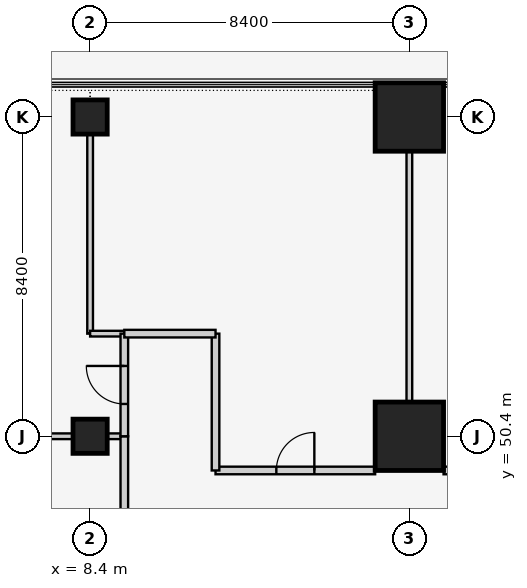
"""IFC4 building model, lengths in metres.
Left out: names, types, materials, properties, quantities, classifications, styles, units other than length and angle.
Written with IfcOpenShell. Run it as: python <this file> out.ifc"""

import sys

from ifc_helpers import new_model, si_unit, direction, frame, frame_2d, origin, origin_2d, place, context, subcontext, project, spatial, rectangle, extrude, element, fill, save


model = new_model("IFC4")
c1 = context("Model", 3, precision=1e-05, world=origin(), true_north=direction((0.0, 1.0)))
c2 = subcontext(c1, "Body", "Model", "MODEL_VIEW")
j1 = project(units=[si_unit("LENGTHUNIT", "METRE"), si_unit("PLANEANGLEUNIT", "RADIAN")], contexts=[c1])
p1 = place(None, origin())
s1 = spatial("IfcSite", under=j1, at=p1, CompositionType="ELEMENT")
p2 = place(p1, origin())
s2 = spatial("IfcBuilding", under=s1, at=p2, CompositionType="ELEMENT")
p3 = place(p2, origin())
s3 = spatial("IfcBuildingStorey", under=s2, at=p3, CompositionType="ELEMENT", Elevation=0.0)
for number, where, z_axis, x_axis in (
    (1, (8.4, 50.4, 0.0), (0.0, 0.0, 1.0), (1.0, 0.0, 0.0)),
    (2, (8.4, 58.8, 0.0), (0.0, 0.0, 1.0), (1.0, 0.0, 0.0)),
):
    element("IfcColumn", number, at=place(p3, frame(where, z_axis=z_axis, x_axis=x_axis)), inside=s3, PredefinedType="COLUMN", context=c2, shape_type="SweptSolid", body=[
        extrude(rectangle(XDim=0.9, YDim=0.9, at=origin_2d()), origin(), (0.0, 0.0, 1.0), 6.0),
    ])
for number, where, z_axis, x_axis in (
    (3, (16.8, 50.4, 0.0), (0.0, 0.0, 1.0), (1.0, 0.0, 0.0)),
    (4, (16.8, 58.8, 0.0), (0.0, 0.0, 1.0), (1.0, 0.0, 0.0)),
):
    element("IfcColumn", number, at=place(p3, frame(where, z_axis=z_axis, x_axis=x_axis)), inside=s3, PredefinedType="COLUMN", context=c2, shape_type="SweptSolid", body=[
        extrude(rectangle(XDim=1.8, YDim=1.8, at=origin_2d()), origin(), (0.0, 0.0, 1.0), 6.0),
    ])
p4 = place(p3, frame((0.45, 50.4, 0.0), z_axis=(0.0, 0.0, 1.0), x_axis=(1.0, 0.0, 0.0)))
e5 = element("IfcWall", 5, at=p4, inside=s3, PredefinedType="PARTITIONING", context=c2, shape_type="SweptSolid", body=[
    extrude(rectangle(XDim=7.5, YDim=0.15, at=frame_2d((3.75, 0.0))), origin(), (0.0, 0.0, 1.0), 5.043),
])
p5 = place(p3, frame((8.85, 50.4, 0.0), z_axis=(0.0, 0.0, 1.0), x_axis=(1.0, 0.0, 0.0)))
e6 = element("IfcWall", 6, at=p5, inside=s3, PredefinedType="PARTITIONING", context=c2, shape_type="SweptSolid", body=[
    extrude(rectangle(XDim=0.45, YDim=0.15, at=frame_2d((0.225, 0.0))), origin(), (0.0, 0.0, 1.0), 5.043),
])
p6 = place(p3, frame((9.3, 50.4, 0.0), z_axis=(0.0, 0.0, 1.0), x_axis=(0.0, -1.0, 0.0)))
e7 = element("IfcWall", 7, at=p6, inside=s3, PredefinedType="PARTITIONING", context=c2, shape_type="SweptSolid", body=[
    extrude(rectangle(XDim=5.8, YDim=0.2, at=frame_2d((2.9, 0.0))), origin(), (0.0, 0.0, 1.0), 5.8),
])
p7 = place(p6, frame((2.4, 0.0, 0.0)))
e8 = element("IfcOpeningElement", 8, at=p7, cuts=e7, PredefinedType="OPENING", context=c2, shape_type="SweptSolid", body=[
    extrude(rectangle(XDim=1.0, YDim=2.1, at=frame_2d((0.5, 1.05))), frame((0.0, 0.11, 0.0), z_axis=(0.0, -1.0, 0.0), x_axis=(1.0, 0.0, 0.0)), (0.0, 0.0, 1.0), 0.22),
])
p8 = place(p3, frame((16.8, 51.3, 0.0), z_axis=(0.0, 0.0, 1.0), x_axis=(0.0, 1.0, 0.0)))
e9 = element("IfcWall", 9, at=p8, inside=s3, PredefinedType="PARTITIONING", context=c2, shape_type="SweptSolid", body=[
    extrude(rectangle(XDim=6.6, YDim=0.15, at=frame_2d((3.3, 0.0))), origin(), (0.0, 0.0, 1.0), 5.043),
])
p9 = place(p3, frame((24.3, 49.5, 0.0), z_axis=(0.0, 0.0, 1.0), x_axis=(-1.0, 0.0, 0.0)))
e10 = element("IfcWall", 10, at=p9, inside=s3, PredefinedType="PARTITIONING", context=c2, shape_type="SweptSolid", body=[
    extrude(rectangle(XDim=6.6, YDim=0.2, at=frame_2d((3.3, 0.0))), origin(), (0.0, 0.0, 1.0), 5.8),
])
p10 = place(p9, frame((2.8, 0.0, 0.0)))
e11 = element("IfcOpeningElement", 11, at=p10, cuts=e10, PredefinedType="OPENING", context=c2, shape_type="SweptSolid", body=[
    extrude(rectangle(XDim=1.0, YDim=2.1, at=frame_2d((0.5, 1.05))), frame((0.0, 0.11, 0.0), z_axis=(0.0, -1.0, 0.0), x_axis=(1.0, 0.0, 0.0)), (0.0, 0.0, 1.0), 0.22),
])
p11 = place(p3, frame((8.4, 58.35, 0.0), z_axis=(0.0, 0.0, 1.0), x_axis=(0.0, -1.0, 0.0)))
e12 = element("IfcWall", 12, at=p11, inside=s3, PredefinedType="PARTITIONING", context=c2, shape_type="SweptSolid", body=[
    extrude(rectangle(XDim=5.25, YDim=0.15, at=frame_2d((2.625, 0.0))), origin(), (0.0, 0.0, 1.0), 5.043),
])
p12 = place(p3, frame((8.4, 53.1, 0.0), z_axis=(0.0, 0.0, 1.0), x_axis=(1.0, 0.0, 0.0)))
e13 = element("IfcWall", 13, at=p12, inside=s3, PredefinedType="PARTITIONING", context=c2, shape_type="SweptSolid", body=[
    extrude(rectangle(XDim=0.9, YDim=0.15, at=frame_2d((0.45, 0.0))), origin(), (0.0, 0.0, 1.0), 5.8),
])
p13 = place(p3, frame((9.3, 53.1, 0.0), z_axis=(0.0, 0.0, 1.0), x_axis=(0.0, -1.0, 0.0)))
e14 = element("IfcWall", 14, at=p13, inside=s3, PredefinedType="PARTITIONING", context=c2, shape_type="SweptSolid", body=[
    extrude(rectangle(XDim=2.7, YDim=0.2, at=frame_2d((1.35, 0.0))), origin(), (0.0, 0.0, 1.0), 5.8),
])
p14 = place(p13, frame((0.85, 0.0, 0.0)))
e15 = element("IfcOpeningElement", 15, at=p14, cuts=e14, PredefinedType="OPENING", context=c2, shape_type="SweptSolid", body=[
    extrude(rectangle(XDim=1.0, YDim=2.1, at=frame_2d((0.5, 1.05))), frame((0.0, 0.11, 0.0), z_axis=(0.0, -1.0, 0.0), x_axis=(1.0, 0.0, 0.0)), (0.0, 0.0, 1.0), 0.22),
])
p15 = place(p3, frame((15.9, 49.5, 0.0), z_axis=(0.0, 0.0, 1.0), x_axis=(-1.0, 0.0, 0.0)))
e16 = element("IfcWall", 16, at=p15, inside=s3, PredefinedType="PARTITIONING", context=c2, shape_type="SweptSolid", body=[
    extrude(rectangle(XDim=4.2, YDim=0.2, at=frame_2d((2.1, 0.0))), origin(), (0.0, 0.0, 1.0), 5.8),
])
p16 = place(p15, frame((1.6, 0.0, 0.0)))
e17 = element("IfcOpeningElement", 17, at=p16, cuts=e16, PredefinedType="OPENING", context=c2, shape_type="SweptSolid", body=[
    extrude(rectangle(XDim=1.0, YDim=2.1, at=frame_2d((0.5, 1.05))), frame((0.0, 0.11, 0.0), z_axis=(0.0, -1.0, 0.0), x_axis=(1.0, 0.0, 0.0)), (0.0, 0.0, 1.0), 0.22),
])
p17 = place(p3, frame((11.7, 49.5, 0.0), z_axis=(0.0, 0.0, 1.0), x_axis=(0.0, 1.0, 0.0)))
e18 = element("IfcWall", 18, at=p17, inside=s3, PredefinedType="PARTITIONING", context=c2, shape_type="SweptSolid", body=[
    extrude(rectangle(XDim=3.6, YDim=0.2, at=frame_2d((1.8, 0.0))), origin(), (0.0, 0.0, 1.0), 5.8),
])
p18 = place(p3, frame((11.7, 53.1, 0.0), z_axis=(0.0, 0.0, 1.0), x_axis=(-1.0, 0.0, 0.0)))
e19 = element("IfcWall", 19, at=p18, inside=s3, PredefinedType="PARTITIONING", context=c2, shape_type="SweptSolid", body=[
    extrude(rectangle(XDim=2.4, YDim=0.2, at=frame_2d((1.2, 0.0))), origin(), (0.0, 0.0, 1.0), 5.8),
])
p19 = place(p14, frame((1.0, 0.0, 0.0), z_axis=(0.0, 0.0, 1.0), x_axis=(-1.0, 0.0, 0.0)))
e20 = element("IfcDoor", 20, at=p19, inside=s3, OperationType="SINGLE_SWING_RIGHT", PredefinedType="DOOR", context=c2, shape_type="SweptSolid", body=[
    extrude(rectangle(XDim=1.0, YDim=2.1, at=frame_2d((0.5, 1.05))), frame((0.0, 0.025, 0.0), z_axis=(0.0, -1.0, 0.0), x_axis=(1.0, 0.0, 0.0)), (0.0, 0.0, 1.0), 0.05),
])
fill(e15, e20)
p20 = place(p16, frame((1.0, 0.0, 0.0), z_axis=(0.0, 0.0, 1.0), x_axis=(-1.0, 0.0, 0.0)))
e21 = element("IfcDoor", 21, at=p20, inside=s3, OperationType="SINGLE_SWING_RIGHT", PredefinedType="DOOR", context=c2, shape_type="SweptSolid", body=[
    extrude(rectangle(XDim=1.0, YDim=2.1, at=frame_2d((0.5, 1.05))), frame((0.0, 0.025, 0.0), z_axis=(0.0, -1.0, 0.0), x_axis=(1.0, 0.0, 0.0)), (0.0, 0.0, 1.0), 0.05),
])
fill(e17, e21)
save(model, sys.argv[1])
